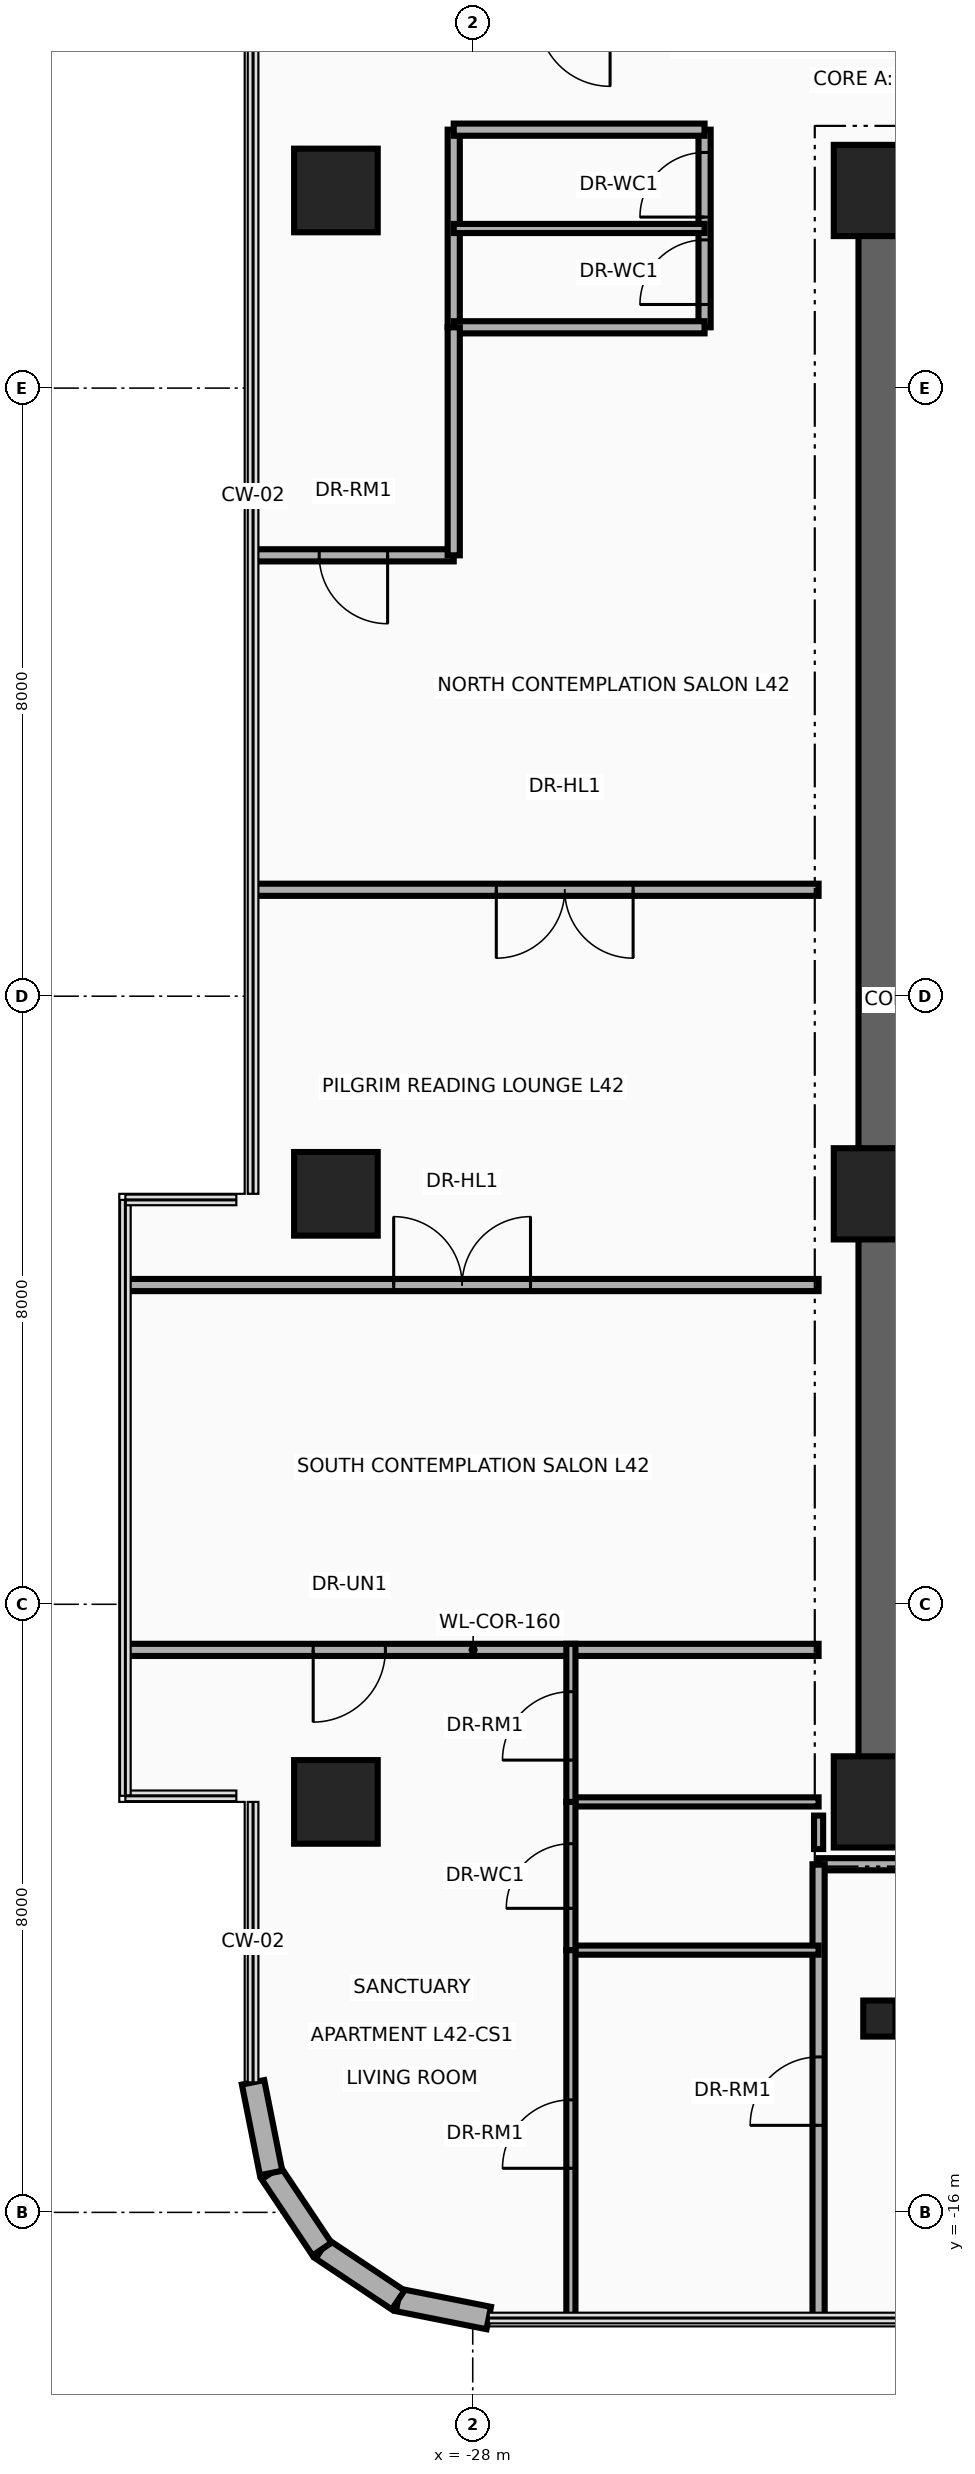
"""IFC4 building model, lengths in metres.
Left out: names, types, materials, properties, quantities, classifications, styles, units other than length and angle.
Written with IfcOpenShell. Run it as: python <this file> out.ifc"""

import sys

from ifc_helpers import new_model, si_unit, direction, frame, frame_2d, origin, origin_2d, place, context, subcontext, project, spatial, rectangle, circle, i_section, extrude, source, transform, mapped, element, fill, save


model = new_model("IFC4")
c1 = context("Model", 3, precision=1e-05, world=origin(), true_north=direction((0.0, 1.0)))
c2 = subcontext(c1, "Body", "Model", "MODEL_VIEW")
j1 = project(units=[si_unit("LENGTHUNIT", "METRE"), si_unit("PLANEANGLEUNIT", "RADIAN")], contexts=[c1])
p1 = place(None, origin())
s1 = spatial("IfcSite", under=j1, at=p1, CompositionType="ELEMENT")
p2 = place(p1, origin())
s2 = spatial("IfcBuilding", under=s1, at=p2, CompositionType="ELEMENT")
p3 = place(p2, frame((0.0, 0.0, 164.9)))
s3 = spatial("IfcBuildingStorey", under=s2, at=p3, CompositionType="ELEMENT", Elevation=164.9)
p4 = place(p3, frame((-22.65, -11.075, 0.0), z_axis=(0.0, 0.0, 1.0), x_axis=(0.0, 1.0, 0.0)))
e1 = element("IfcWall", 1, at=p4, inside=s3, PredefinedType="SHEAR", context=c2, shape_type="SweptSolid", body=[
    extrude(rectangle(XDim=22.15, YDim=0.55, at=frame_2d((11.075, 0.0))), origin(), (0.0, 0.0, 1.0), 3.46),
])
for number, where, z_axis, x_axis in (
    (2, (-22.65, 10.8, 0.0), (0.0, 0.0, 1.0), (1.0, 0.0, 0.0)),
    (3, (-22.65, -10.8, 0.0), (0.0, 0.0, 1.0), (1.0, 0.0, 0.0)),
):
    element("IfcWall", number, at=place(p3, frame(where, z_axis=z_axis, x_axis=x_axis)), inside=s3, PredefinedType="SHEAR", context=c2, shape_type="SweptSolid", body=[
        extrude(rectangle(XDim=10.25, YDim=0.55, at=frame_2d((5.125, 0.0))), origin(), (0.0, 0.0, 1.0), 3.46),
    ])
m1 = source(origin(), c2, "Body", "SweptSolid", [
    extrude(circle(Radius=0.55, at=origin_2d()), origin(), (0.0, 0.0, 1.0), 3.7),
])
p5 = place(p3, frame((-29.8, -10.6, 0.0), z_axis=(0.0, 0.0, 1.0), x_axis=(1.0, 0.0, 0.0)))
e4 = element("IfcColumn", 4, at=p5, inside=s3, PredefinedType="COLUMN", context=c2, shape_type="MappedRepresentation", body=[
    mapped(m1, transform((0.0, 0.0, 0.0), x_axis=(1.0, 0.0, 0.0), y_axis=(0.0, 1.0, 0.0), z_axis=(0.0, 0.0, 1.0), scale=1.0)),
])
m2 = source(origin(), c2, "Body", "SweptSolid", [
    extrude(rectangle(XDim=1.2, YDim=1.2, at=origin_2d()), origin(), (0.0, 0.0, 1.0), 3.7),
])
p6 = place(p3, frame((-22.65, -10.6, 0.0), z_axis=(0.0, 0.0, 1.0), x_axis=(1.0, 0.0, 0.0)))
e5 = element("IfcColumn", 5, at=p6, inside=s3, PredefinedType="COLUMN", context=c2, shape_type="MappedRepresentation", body=[
    mapped(m2, transform((0.0, 0.0, 0.0), x_axis=(1.0, 0.0, 0.0), y_axis=(0.0, 1.0, 0.0), z_axis=(0.0, 0.0, 1.0), scale=1.0)),
])
p7 = place(p3, frame((-29.8, -2.6, 0.0), z_axis=(0.0, 0.0, 1.0), x_axis=(1.0, 0.0, 0.0)))
e6 = element("IfcColumn", 6, at=p7, inside=s3, PredefinedType="COLUMN", context=c2, shape_type="MappedRepresentation", body=[
    mapped(m1, transform((0.0, 0.0, 0.0), x_axis=(1.0, 0.0, 0.0), y_axis=(0.0, 1.0, 0.0), z_axis=(0.0, 0.0, 1.0), scale=1.0)),
])
p8 = place(p3, frame((-22.65, -2.6, 0.0), z_axis=(0.0, 0.0, 1.0), x_axis=(1.0, 0.0, 0.0)))
e7 = element("IfcColumn", 7, at=p8, inside=s3, PredefinedType="COLUMN", context=c2, shape_type="MappedRepresentation", body=[
    mapped(m2, transform((0.0, 0.0, 0.0), x_axis=(1.0, 0.0, 0.0), y_axis=(0.0, 1.0, 0.0), z_axis=(0.0, 0.0, 1.0), scale=1.0)),
])
p9 = place(p3, frame((-29.8, 10.6, 0.0), z_axis=(0.0, 0.0, 1.0), x_axis=(1.0, 0.0, 0.0)))
e8 = element("IfcColumn", 8, at=p9, inside=s3, PredefinedType="COLUMN", context=c2, shape_type="MappedRepresentation", body=[
    mapped(m1, transform((0.0, 0.0, 0.0), x_axis=(1.0, 0.0, 0.0), y_axis=(0.0, 1.0, 0.0), z_axis=(0.0, 0.0, 1.0), scale=1.0)),
])
p10 = place(p3, frame((-22.65, 10.6, 0.0), z_axis=(0.0, 0.0, 1.0), x_axis=(1.0, 0.0, 0.0)))
e9 = element("IfcColumn", 9, at=p10, inside=s3, PredefinedType="COLUMN", context=c2, shape_type="MappedRepresentation", body=[
    mapped(m2, transform((0.0, 0.0, 0.0), x_axis=(1.0, 0.0, 0.0), y_axis=(0.0, 1.0, 0.0), z_axis=(0.0, 0.0, 1.0), scale=1.0)),
])
m3 = source(origin(), c2, "Body", "SweptSolid", [
    extrude(i_section(OverallWidth=0.424, OverallDepth=0.474, WebThickness=0.048, FlangeThickness=0.077, at=origin_2d()), origin(), (0.0, 0.0, 1.0), 3.7),
])
p11 = place(p3, frame((-22.65, -13.45, 0.0), z_axis=(0.0, 0.0, 1.0), x_axis=(1.0, 0.0, 0.0)))
e10 = element("IfcColumn", 10, at=p11, inside=s3, PredefinedType="COLUMN", context=c2, shape_type="MappedRepresentation", body=[
    mapped(m3, transform((0.0, 0.0, 0.0), x_axis=(1.0, 0.0, 0.0), y_axis=(0.0, 1.0, 0.0), z_axis=(0.0, 0.0, 1.0), scale=1.0)),
])
p12 = place(p3, frame((-27.789, -17.39, 0.0), z_axis=(0.0, 0.0, 1.0), x_axis=(-0.980804027463, 0.194996050505, 0.0)))
e11 = element("IfcWall", 11, at=p12, inside=s3, PredefinedType="SOLIDWALL", context=c2, shape_type="SweptSolid", body=[
    extrude(rectangle(XDim=1.216, YDim=0.3, at=frame_2d((0.608, 0.0))), origin(), (0.0, 0.0, 1.0), 3.46),
])
for number, where, z_axis, x_axis in (
    (12, (-28.982, -17.153, 0.0), (0.0, 0.0, 1.0), (-0.831, 0.556, 0.0)),
    (13, (-29.983, -16.483, 0.0), (0.0, 0.0, 1.0), (-0.556, 0.831, 0.0)),
):
    element("IfcWall", number, at=place(p3, frame(where, z_axis=z_axis, x_axis=x_axis)), inside=s3, PredefinedType="SOLIDWALL", context=c2, shape_type="SweptSolid", body=[
        extrude(rectangle(XDim=1.205, YDim=0.3, at=frame_2d((0.603, 0.0))), origin(), (0.0, 0.0, 1.0), 3.46),
    ])
p13 = place(p3, frame((-30.653, -15.482, 0.0), z_axis=(0.0, 0.0, 1.0), x_axis=(-0.194996050505, 0.980804027463, 0.0)))
e14 = element("IfcWall", 14, at=p13, inside=s3, PredefinedType="SOLIDWALL", context=c2, shape_type="SweptSolid", body=[
    extrude(rectangle(XDim=1.216, YDim=0.3, at=frame_2d((0.608, 0.0))), origin(), (0.0, 0.0, 1.0), 3.46),
])
p14 = place(p3, frame((-28.25, 8.8, 0.0), z_axis=(0.0, 0.0, 1.0), x_axis=(0.0, 1.0, 0.0)))
e15 = element("IfcWall", 15, at=p14, inside=s3, PredefinedType="PARTITIONING", context=c2, shape_type="SweptSolid", body=[
    extrude(rectangle(XDim=2.6, YDim=0.16, at=frame_2d((1.3, 0.0))), origin(), (0.0, 0.0, 1.0), 2.666),
])
p15 = place(p3, frame((-24.95, 8.8, 0.0), z_axis=(0.0, 0.0, 1.0), x_axis=(0.0, 1.0, 0.0)))
e16 = element("IfcWall", 16, at=p15, inside=s3, PredefinedType="PARTITIONING", context=c2, shape_type="SweptSolid", body=[
    extrude(rectangle(XDim=2.6, YDim=0.16, at=frame_2d((1.3, 0.0))), origin(), (0.0, 0.0, 1.0), 2.666),
])
p16 = place(p15, frame((0.3, 0.0, 0.0)))
e17 = element("IfcOpeningElement", 17, at=p16, cuts=e16, PredefinedType="OPENING", context=c2, shape_type="SweptSolid", body=[
    extrude(rectangle(XDim=0.85, YDim=2.1, at=frame_2d((0.425, 1.05))), frame((0.0, 0.095, 0.0), z_axis=(0.0, -1.0, 0.0), x_axis=(1.0, 0.0, 0.0)), (0.0, 0.0, 1.0), 0.19),
])
p17 = place(p15, frame((1.45, 0.0, 0.0)))
e18 = element("IfcOpeningElement", 18, at=p17, cuts=e16, PredefinedType="OPENING", context=c2, shape_type="SweptSolid", body=[
    extrude(rectangle(XDim=0.85, YDim=2.1, at=frame_2d((0.425, 1.05))), frame((0.0, 0.095, 0.0), z_axis=(0.0, -1.0, 0.0), x_axis=(1.0, 0.0, 0.0)), (0.0, 0.0, 1.0), 0.19),
])
for number, where, z_axis, x_axis in (
    (19, (-28.25, 8.8, 0.0), (0.0, 0.0, 1.0), (1.0, 0.0, 0.0)),
    (20, (-28.25, 11.4, 0.0), (0.0, 0.0, 1.0), (1.0, 0.0, 0.0)),
):
    element("IfcWall", number, at=place(p3, frame(where, z_axis=z_axis, x_axis=x_axis)), inside=s3, PredefinedType="PARTITIONING", context=c2, shape_type="SweptSolid", body=[
        extrude(rectangle(XDim=3.3, YDim=0.16, at=frame_2d((1.65, 0.0))), origin(), (0.0, 0.0, 1.0), 3.46),
    ])
p18 = place(p3, frame((-28.25, 10.1, 0.0), z_axis=(0.0, 0.0, 1.0), x_axis=(1.0, 0.0, 0.0)))
e21 = element("IfcWall", 21, at=p18, inside=s3, PredefinedType="PARTITIONING", context=c2, shape_type="SweptSolid", body=[
    extrude(rectangle(XDim=3.3, YDim=0.12, at=frame_2d((1.65, 0.0))), origin(), (0.0, 0.0, 1.0), 3.46),
])
p19 = place(p3, frame((-23.45, -11.42, 0.0), z_axis=(0.0, 0.0, 1.0), x_axis=(1.0, 0.0, 0.0)))
e22 = element("IfcWall", 22, at=p19, inside=s3, PredefinedType="PARTITIONING", context=c2, shape_type="SweptSolid", body=[
    extrude(rectangle(XDim=13.84, YDim=0.16, at=frame_2d((6.92, 0.0))), origin(), (0.0, 0.0, 1.0), 2.834),
])
p20 = place(p3, frame((-23.45, -17.39, 0.0), z_axis=(0.0, 0.0, 1.0), x_axis=(0.0, 1.0, 0.0)))
e23 = element("IfcWall", 23, at=p20, inside=s3, PredefinedType="PARTITIONING", context=c2, shape_type="SweptSolid", body=[
    extrude(rectangle(XDim=5.97, YDim=0.16, at=frame_2d((2.985, 0.0))), origin(), (0.0, 0.0, 1.0), 3.46),
])
p21 = place(p20, frame((2.535, 0.0, 0.0)))
e24 = element("IfcOpeningElement", 24, at=p21, cuts=e23, PredefinedType="OPENING", context=c2, shape_type="SweptSolid", body=[
    extrude(rectangle(XDim=0.9, YDim=2.1, at=frame_2d((0.45, 1.05))), frame((0.0, 0.095, 0.0), z_axis=(0.0, -1.0, 0.0), x_axis=(1.0, 0.0, 0.0)), (0.0, 0.0, 1.0), 0.19),
])
p22 = place(p3, frame((-32.54, -8.6, 0.0), z_axis=(0.0, 0.0, 1.0), x_axis=(1.0, 0.0, 0.0)))
e25 = element("IfcWall", 25, at=p22, inside=s3, PredefinedType="PARTITIONING", context=c2, shape_type="SweptSolid", body=[
    extrude(rectangle(XDim=9.09, YDim=0.16, at=frame_2d((4.545, 0.0))), origin(), (0.0, 0.0, 1.0), 2.896),
])
p23 = place(p22, frame((2.441, 0.0, 0.0)))
e26 = element("IfcOpeningElement", 26, at=p23, cuts=e25, PredefinedType="OPENING", context=c2, shape_type="SweptSolid", body=[
    extrude(rectangle(XDim=0.95, YDim=2.15, at=frame_2d((0.475, 1.075))), frame((0.0, 0.095, 0.0), z_axis=(0.0, -1.0, 0.0), x_axis=(1.0, 0.0, 0.0)), (0.0, 0.0, 1.0), 0.19),
])
p24 = place(p3, frame((-30.89, 5.8, 0.0), z_axis=(0.0, 0.0, 1.0), x_axis=(1.0, 0.0, 0.0)))
e27 = element("IfcWall", 27, at=p24, inside=s3, PredefinedType="PARTITIONING", context=c2, shape_type="SweptSolid", body=[
    extrude(rectangle(XDim=2.64, YDim=0.16, at=frame_2d((1.32, 0.0))), origin(), (0.0, 0.0, 1.0), 2.896),
])
p25 = place(p24, frame((0.87, 0.0, 0.0)))
e28 = element("IfcOpeningElement", 28, at=p25, cuts=e27, PredefinedType="OPENING", context=c2, shape_type="SweptSolid", body=[
    extrude(rectangle(XDim=0.9, YDim=2.1, at=frame_2d((0.45, 1.05))), frame((0.0, 0.095, 0.0), z_axis=(0.0, -1.0, 0.0), x_axis=(1.0, 0.0, 0.0)), (0.0, 0.0, 1.0), 0.19),
])
p26 = place(p3, frame((-28.25, 5.8, 0.0), z_axis=(0.0, 0.0, 1.0), x_axis=(0.0, 1.0, 0.0)))
e29 = element("IfcWall", 29, at=p26, inside=s3, PredefinedType="PARTITIONING", context=c2, shape_type="SweptSolid", body=[
    extrude(rectangle(XDim=3.0, YDim=0.16, at=frame_2d((1.5, 0.0))), origin(), (0.0, 0.0, 1.0), 2.988),
])
p27 = place(p3, frame((-26.708, -10.6, 0.0), z_axis=(0.0, 0.0, 1.0), x_axis=(1.0, 0.0, 0.0)))
e30 = element("IfcWall", 30, at=p27, inside=s3, PredefinedType="PARTITIONING", context=c2, shape_type="SweptSolid", body=[
    extrude(rectangle(XDim=3.259, YDim=0.12, at=frame_2d((1.629, 0.0))), origin(), (0.0, 0.0, 1.0), 2.666),
])
p28 = place(p3, frame((-26.708, -12.55, 0.0), z_axis=(0.0, 0.0, 1.0), x_axis=(1.0, 0.0, 0.0)))
e31 = element("IfcWall", 31, at=p28, inside=s3, PredefinedType="PARTITIONING", context=c2, shape_type="SweptSolid", body=[
    extrude(rectangle(XDim=3.259, YDim=0.12, at=frame_2d((1.629, 0.0))), origin(), (0.0, 0.0, 1.0), 3.46),
])
p29 = place(p3, frame((-26.708, -12.55, 0.0), z_axis=(0.0, 0.0, 1.0), x_axis=(0.0, 1.0, 0.0)))
e32 = element("IfcWall", 32, at=p29, inside=s3, PredefinedType="PARTITIONING", context=c2, shape_type="SweptSolid", body=[
    extrude(rectangle(XDim=1.95, YDim=0.12, at=frame_2d((0.975, 0.0))), origin(), (0.0, 0.0, 1.0), 2.666),
])
p30 = place(p29, frame((0.55, 0.0, 0.0)))
e33 = element("IfcOpeningElement", 33, at=p30, cuts=e32, PredefinedType="OPENING", context=c2, shape_type="SweptSolid", body=[
    extrude(rectangle(XDim=0.85, YDim=2.1, at=frame_2d((0.425, 1.05))), frame((0.0, 0.075, 0.0), z_axis=(0.0, -1.0, 0.0), x_axis=(1.0, 0.0, 0.0)), (0.0, 0.0, 1.0), 0.15),
])
p31 = place(p3, frame((-26.708, -10.6, 0.0), z_axis=(0.0, 0.0, 1.0), x_axis=(0.0, 1.0, 0.0)))
e34 = element("IfcWall", 34, at=p31, inside=s3, PredefinedType="PARTITIONING", context=c2, shape_type="SweptSolid", body=[
    extrude(rectangle(XDim=2.08, YDim=0.12, at=frame_2d((1.04, 0.0))), origin(), (0.0, 0.0, 1.0), 2.666),
])
p32 = place(p31, frame((0.55, 0.0, 0.0)))
e35 = element("IfcOpeningElement", 35, at=p32, cuts=e34, PredefinedType="OPENING", context=c2, shape_type="SweptSolid", body=[
    extrude(rectangle(XDim=0.9, YDim=2.1, at=frame_2d((0.45, 1.05))), frame((0.0, 0.075, 0.0), z_axis=(0.0, -1.0, 0.0), x_axis=(1.0, 0.0, 0.0)), (0.0, 0.0, 1.0), 0.15),
])
p33 = place(p3, frame((-26.708, -17.39, 0.0), z_axis=(0.0, 0.0, 1.0), x_axis=(0.0, 1.0, 0.0)))
e36 = element("IfcWall", 36, at=p33, inside=s3, PredefinedType="PARTITIONING", context=c2, shape_type="SweptSolid", body=[
    extrude(rectangle(XDim=4.84, YDim=0.12, at=frame_2d((2.42, 0.0))), origin(), (0.0, 0.0, 1.0), 3.46),
])
p34 = place(p33, frame((1.97, 0.0, 0.0)))
e37 = element("IfcOpeningElement", 37, at=p34, cuts=e36, PredefinedType="OPENING", context=c2, shape_type="SweptSolid", body=[
    extrude(rectangle(XDim=0.9, YDim=2.1, at=frame_2d((0.45, 1.05))), frame((0.0, 0.075, 0.0), z_axis=(0.0, -1.0, 0.0), x_axis=(1.0, 0.0, 0.0)), (0.0, 0.0, 1.0), 0.15),
])
p35 = place(p3, frame((-23.45, -11.22, 0.0), z_axis=(0.0, 0.0, 1.0), x_axis=(0.0, 1.0, 0.0)))
e38 = element("IfcWall", 38, at=p35, inside=s3, PredefinedType="PARTITIONING", context=c2, shape_type="SweptSolid", body=[
    extrude(rectangle(XDim=0.44, YDim=0.12, at=frame_2d((0.22, 0.0))), origin(), (0.0, 0.0, 1.0), 2.666),
])
p36 = place(p3, frame((-32.54, -3.8, 0.0), z_axis=(0.0, 0.0, 1.0), x_axis=(1.0, 0.0, 0.0)))
e39 = element("IfcWall", 39, at=p36, inside=s3, PredefinedType="PARTITIONING", context=c2, shape_type="SweptSolid", body=[
    extrude(rectangle(XDim=9.09, YDim=0.16, at=frame_2d((4.545, 0.0))), origin(), (0.0, 0.0, 1.0), 2.896),
])
p37 = place(p36, frame((3.5, 0.0, 0.0)))
e40 = element("IfcOpeningElement", 40, at=p37, cuts=e39, PredefinedType="OPENING", context=c2, shape_type="SweptSolid", body=[
    extrude(rectangle(XDim=1.8, YDim=2.15, at=frame_2d((0.9, 1.075))), frame((0.0, 0.095, 0.0), z_axis=(0.0, -1.0, 0.0), x_axis=(1.0, 0.0, 0.0)), (0.0, 0.0, 1.0), 0.19),
])
p38 = place(p3, frame((-30.89, 1.4, 0.0), z_axis=(0.0, 0.0, 1.0), x_axis=(1.0, 0.0, 0.0)))
e41 = element("IfcWall", 41, at=p38, inside=s3, PredefinedType="PARTITIONING", context=c2, shape_type="SweptSolid", body=[
    extrude(rectangle(XDim=7.44, YDim=0.16, at=frame_2d((3.72, 0.0))), origin(), (0.0, 0.0, 1.0), 2.896),
])
p39 = place(p38, frame((3.2, 0.0, 0.0)))
e42 = element("IfcOpeningElement", 42, at=p39, cuts=e41, PredefinedType="OPENING", context=c2, shape_type="SweptSolid", body=[
    extrude(rectangle(XDim=1.8, YDim=2.15, at=frame_2d((0.9, 1.075))), frame((0.0, 0.095, 0.0), z_axis=(0.0, -1.0, 0.0), x_axis=(1.0, 0.0, 0.0)), (0.0, 0.0, 1.0), 0.19),
])
p40 = place(p16, origin())
e43 = element("IfcDoor", 43, at=p40, inside=s3, OperationType="SINGLE_SWING_LEFT", PredefinedType="DOOR", context=c2, shape_type="SweptSolid", body=[
    extrude(rectangle(XDim=0.85, YDim=2.1, at=frame_2d((0.425, 1.05))), frame((0.0, 0.025, 0.0), z_axis=(0.0, -1.0, 0.0), x_axis=(1.0, 0.0, 0.0)), (0.0, 0.0, 1.0), 0.05),
])
fill(e17, e43)
p41 = place(p17, origin())
e44 = element("IfcDoor", 44, at=p41, inside=s3, OperationType="SINGLE_SWING_RIGHT", PredefinedType="DOOR", context=c2, shape_type="SweptSolid", body=[
    extrude(rectangle(XDim=0.85, YDim=2.1, at=frame_2d((0.425, 1.05))), frame((0.0, 0.025, 0.0), z_axis=(0.0, -1.0, 0.0), x_axis=(1.0, 0.0, 0.0)), (0.0, 0.0, 1.0), 0.05),
])
fill(e18, e44)
p42 = place(p23, frame((0.95, 0.0, 0.0), z_axis=(0.0, 0.0, 1.0), x_axis=(-1.0, 0.0, 0.0)))
e45 = element("IfcDoor", 45, at=p42, inside=s3, OperationType="SINGLE_SWING_LEFT", PredefinedType="DOOR", context=c2, shape_type="SweptSolid", body=[
    extrude(rectangle(XDim=0.95, YDim=2.15, at=frame_2d((0.475, 1.075))), frame((0.0, 0.025, 0.0), z_axis=(0.0, -1.0, 0.0), x_axis=(1.0, 0.0, 0.0)), (0.0, 0.0, 1.0), 0.05),
])
fill(e26, e45)
p43 = place(p30, origin())
e46 = element("IfcDoor", 46, at=p43, inside=s3, OperationType="SINGLE_SWING_RIGHT", PredefinedType="DOOR", context=c2, shape_type="SweptSolid", body=[
    extrude(rectangle(XDim=0.85, YDim=2.1, at=frame_2d((0.425, 1.05))), frame((0.0, 0.025, 0.0), z_axis=(0.0, -1.0, 0.0), x_axis=(1.0, 0.0, 0.0)), (0.0, 0.0, 1.0), 0.05),
])
fill(e33, e46)
p44 = place(p32, origin())
e47 = element("IfcDoor", 47, at=p44, inside=s3, OperationType="SINGLE_SWING_LEFT", PredefinedType="DOOR", context=c2, shape_type="SweptSolid", body=[
    extrude(rectangle(XDim=0.9, YDim=2.1, at=frame_2d((0.45, 1.05))), frame((0.0, 0.025, 0.0), z_axis=(0.0, -1.0, 0.0), x_axis=(1.0, 0.0, 0.0)), (0.0, 0.0, 1.0), 0.05),
])
fill(e35, e47)
p45 = place(p34, origin())
e48 = element("IfcDoor", 48, at=p45, inside=s3, OperationType="SINGLE_SWING_RIGHT", PredefinedType="DOOR", context=c2, shape_type="SweptSolid", body=[
    extrude(rectangle(XDim=0.9, YDim=2.1, at=frame_2d((0.45, 1.05))), frame((0.0, 0.025, 0.0), z_axis=(0.0, -1.0, 0.0), x_axis=(1.0, 0.0, 0.0)), (0.0, 0.0, 1.0), 0.05),
])
fill(e37, e48)
p46 = place(p25, frame((0.9, 0.0, 0.0), z_axis=(0.0, 0.0, 1.0), x_axis=(-1.0, 0.0, 0.0)))
e49 = element("IfcDoor", 49, at=p46, inside=s3, OperationType="SINGLE_SWING_LEFT", PredefinedType="DOOR", context=c2, shape_type="SweptSolid", body=[
    extrude(rectangle(XDim=0.9, YDim=2.1, at=frame_2d((0.45, 1.05))), frame((0.0, 0.025, 0.0), z_axis=(0.0, -1.0, 0.0), x_axis=(1.0, 0.0, 0.0)), (0.0, 0.0, 1.0), 0.05),
])
fill(e28, e49)
p47 = place(p37, origin())
e50 = element("IfcDoor", 50, at=p47, inside=s3, OperationType="DOUBLE_DOOR_SINGLE_SWING", PredefinedType="DOOR", context=c2, shape_type="SweptSolid", body=[
    extrude(rectangle(XDim=1.8, YDim=2.15, at=frame_2d((0.9, 1.075))), frame((0.0, 0.025, 0.0), z_axis=(0.0, -1.0, 0.0), x_axis=(1.0, 0.0, 0.0)), (0.0, 0.0, 1.0), 0.05),
])
fill(e40, e50)
p48 = place(p39, frame((1.8, 0.0, 0.0), z_axis=(0.0, 0.0, 1.0), x_axis=(-1.0, 0.0, 0.0)))
e51 = element("IfcDoor", 51, at=p48, inside=s3, OperationType="DOUBLE_DOOR_SINGLE_SWING", PredefinedType="DOOR", context=c2, shape_type="SweptSolid", body=[
    extrude(rectangle(XDim=1.8, YDim=2.15, at=frame_2d((0.9, 1.075))), frame((0.0, 0.025, 0.0), z_axis=(0.0, -1.0, 0.0), x_axis=(1.0, 0.0, 0.0)), (0.0, 0.0, 1.0), 0.05),
])
fill(e42, e51)
p49 = place(p21, origin())
e52 = element("IfcDoor", 52, at=p49, inside=s3, OperationType="SINGLE_SWING_RIGHT", PredefinedType="DOOR", context=c2, shape_type="SweptSolid", body=[
    extrude(rectangle(XDim=0.9, YDim=2.1, at=frame_2d((0.45, 1.05))), frame((0.0, 0.025, 0.0), z_axis=(0.0, -1.0, 0.0), x_axis=(1.0, 0.0, 0.0)), (0.0, 0.0, 1.0), 0.05),
])
fill(e24, e52)
save(model, sys.argv[1])
